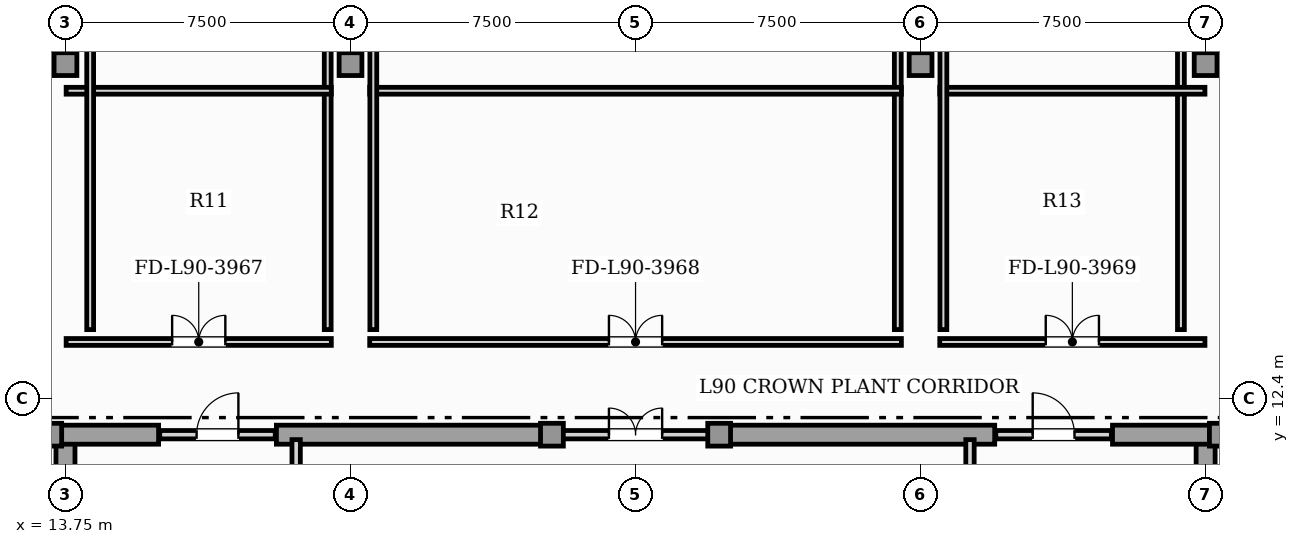
"""IFC4 building model, lengths in metres.
Left out: names, types, materials, properties, quantities, classifications, styles, units other than length and angle.
Written with IfcOpenShell. Run it as: python <this file> out.ifc"""

import sys

from ifc_helpers import new_model, si_unit, direction, frame, frame_2d, origin, origin_2d, place, context, subcontext, project, spatial, rectangle, hollow_rectangle, extrude, element, fill, save


model = new_model("IFC4")
c1 = context("Model", 3, precision=1e-05, world=origin(), true_north=direction((0.0, 1.0)))
c2 = subcontext(c1, "Body", "Model", "MODEL_VIEW")
j1 = project(units=[si_unit("LENGTHUNIT", "METRE"), si_unit("PLANEANGLEUNIT", "RADIAN")], contexts=[c1])
p1 = place(None, origin())
s1 = spatial("IfcSite", under=j1, at=p1, CompositionType="ELEMENT")
p2 = place(p1, origin())
s2 = spatial("IfcBuilding", under=s1, at=p2, CompositionType="ELEMENT")
p3 = place(p2, frame((0.0, 0.0, 366.65)))
s3 = spatial("IfcBuildingStorey", under=s2, at=p3, CompositionType="ELEMENT", Elevation=366.65)
for number, where, z_axis, x_axis in (
    (1, (13.75, 0.92, 0.0), (0.0, 0.0, 1.0), (0.0, 1.0, 0.0)),
    (2, (43.75, 0.92, 0.0), (0.0, 0.0, 1.0), (0.0, 1.0, 0.0)),
):
    element("IfcWall", number, at=place(p3, frame(where, z_axis=z_axis, x_axis=x_axis)), inside=s3, PredefinedType="SHEAR", context=c2, shape_type="SweptSolid", body=[
        extrude(rectangle(XDim=10.53, YDim=0.5, at=frame_2d((5.265, 0.0))), origin(), (0.0, 0.0, 1.0), 5.1),
    ])
p4 = place(p3, frame((13.25, 11.45, 0.0), z_axis=(0.0, 0.0, 1.0), x_axis=(1.0, 0.0, 0.0)))
e3 = element("IfcWall", 3, at=p4, inside=s3, PredefinedType="SHEAR", context=c2, shape_type="SweptSolid", body=[
    extrude(rectangle(XDim=2.95, YDim=0.5, at=frame_2d((1.475, 0.0))), origin(), (0.0, 0.0, 1.0), 5.1),
])
for number, where, z_axis, x_axis in (
    (4, (19.3, 11.45, 0.0), (0.0, 0.0, 1.0), (1.0, 0.0, 0.0)),
    (5, (30.9, 11.45, 0.0), (0.0, 0.0, 1.0), (1.0, 0.0, 0.0)),
):
    element("IfcWall", number, at=place(p3, frame(where, z_axis=z_axis, x_axis=x_axis)), inside=s3, PredefinedType="SHEAR", context=c2, shape_type="SweptSolid", body=[
        extrude(rectangle(XDim=7.3, YDim=0.5, at=frame_2d((3.65, 0.0))), origin(), (0.0, 0.0, 1.0), 5.1),
    ])
p5 = place(p3, frame((41.3, 11.45, 0.0), z_axis=(0.0, 0.0, 1.0), x_axis=(1.0, 0.0, 0.0)))
e6 = element("IfcWall", 6, at=p5, inside=s3, PredefinedType="SHEAR", context=c2, shape_type="SweptSolid", body=[
    extrude(rectangle(XDim=2.95, YDim=0.5, at=frame_2d((1.475, 0.0))), origin(), (0.0, 0.0, 1.0), 5.1),
])
for number, where, z_axis, x_axis in (
    (7, (13.35, 11.45, 0.0), (0.0, 0.0, 1.0), (1.0, 0.0, 0.0)),
    (8, (44.15, 11.45, 0.0), (0.0, 0.0, 1.0), (1.0, 0.0, 0.0)),
    (9, (26.55, 11.45, 0.0), (0.0, 0.0, 1.0), (1.0, 0.0, 0.0)),
    (10, (30.95, 11.45, 0.0), (0.0, 0.0, 1.0), (1.0, 0.0, 0.0)),
    (11, (13.75, 21.2, 0.0), (0.0, 0.0, 1.0), (1.0, 0.0, 0.0)),
    (12, (21.25, 21.2, 0.0), (0.0, 0.0, 1.0), (1.0, 0.0, 0.0)),
    (13, (36.25, 21.2, 0.0), (0.0, 0.0, 1.0), (1.0, 0.0, 0.0)),
    (14, (43.75, 21.2, 0.0), (0.0, 0.0, 1.0), (1.0, 0.0, 0.0)),
):
    element("IfcColumn", number, at=place(p3, frame(where, z_axis=z_axis, x_axis=x_axis)), inside=s3, PredefinedType="USERDEFINED", context=c2, shape_type="SweptSolid", body=[
        extrude(hollow_rectangle(XDim=0.6, YDim=0.6, WallThickness=0.04, at=origin_2d()), origin(), (0.0, 0.0, 1.0), 5.4),
    ])
p6 = place(p3, frame((19.82, 8.52, 0.0), z_axis=(0.0, 0.0, 1.0), x_axis=(0.0, 1.0, 0.0)))
e15 = element("IfcWall", 15, at=p6, inside=s3, PredefinedType="SOLIDWALL", context=c2, shape_type="SweptSolid", body=[
    extrude(rectangle(XDim=2.8, YDim=0.22, at=frame_2d((1.4, 0.0))), origin(), (0.0, 0.0, 1.0), 4.556),
])
p7 = place(p6, frame((0.85, 0.0, 0.0)))
e16 = element("IfcOpeningElement", 16, at=p7, cuts=e15, PredefinedType="OPENING", context=c2, shape_type="SweptSolid", body=[
    extrude(rectangle(XDim=1.1, YDim=2.2, at=frame_2d((0.55, 1.1))), frame((0.0, 0.12, 0.0), z_axis=(0.0, -1.0, 0.0), x_axis=(1.0, 0.0, 0.0)), (0.0, 0.0, 1.0), 0.24),
])
p8 = place(p3, frame((37.55, 8.52, 0.0), z_axis=(0.0, 0.0, 1.0), x_axis=(0.0, 1.0, 0.0)))
e17 = element("IfcWall", 17, at=p8, inside=s3, PredefinedType="SOLIDWALL", context=c2, shape_type="SweptSolid", body=[
    extrude(rectangle(XDim=2.8, YDim=0.22, at=frame_2d((1.4, 0.0))), origin(), (0.0, 0.0, 1.0), 4.556),
])
p9 = place(p8, frame((0.85, 0.0, 0.0)))
e18 = element("IfcOpeningElement", 18, at=p9, cuts=e17, PredefinedType="OPENING", context=c2, shape_type="SweptSolid", body=[
    extrude(rectangle(XDim=1.1, YDim=2.2, at=frame_2d((0.55, 1.1))), frame((0.0, 0.12, 0.0), z_axis=(0.0, -1.0, 0.0), x_axis=(1.0, 0.0, 0.0)), (0.0, 0.0, 1.0), 0.24),
])
p10 = place(p3, frame((16.23, 11.45, 0.0), z_axis=(0.0, 0.0, 1.0), x_axis=(1.0, 0.0, 0.0)))
e19 = element("IfcWall", 19, at=p10, inside=s3, PredefinedType="SOLIDWALL", context=c2, shape_type="SweptSolid", body=[
    extrude(rectangle(XDim=3.04, YDim=0.22, at=frame_2d((1.52, 0.0))), origin(), (0.0, 0.0, 1.0), 5.1),
])
p11 = place(p10, frame((0.97, 0.0, 0.0)))
e20 = element("IfcOpeningElement", 20, at=p11, cuts=e19, PredefinedType="OPENING", context=c2, shape_type="SweptSolid", body=[
    extrude(rectangle(XDim=1.1, YDim=2.2, at=frame_2d((0.55, 1.1))), frame((0.0, 0.12, 0.0), z_axis=(0.0, -1.0, 0.0), x_axis=(1.0, 0.0, 0.0)), (0.0, 0.0, 1.0), 0.24),
])
p12 = place(p3, frame((26.63, 11.45, 0.0), z_axis=(0.0, 0.0, 1.0), x_axis=(1.0, 0.0, 0.0)))
e21 = element("IfcWall", 21, at=p12, inside=s3, PredefinedType="SOLIDWALL", context=c2, shape_type="SweptSolid", body=[
    extrude(rectangle(XDim=4.24, YDim=0.22, at=frame_2d((2.12, 0.0))), origin(), (0.0, 0.0, 1.0), 5.1),
])
p13 = place(p12, frame((1.42, 0.0, 0.0)))
e22 = element("IfcOpeningElement", 22, at=p13, cuts=e21, PredefinedType="OPENING", context=c2, shape_type="SweptSolid", body=[
    extrude(rectangle(XDim=1.4, YDim=2.2, at=frame_2d((0.7, 1.1))), frame((0.0, 0.12, 0.0), z_axis=(0.0, -1.0, 0.0), x_axis=(1.0, 0.0, 0.0)), (0.0, 0.0, 1.0), 0.24),
])
p14 = place(p3, frame((38.23, 11.45, 0.0), z_axis=(0.0, 0.0, 1.0), x_axis=(1.0, 0.0, 0.0)))
e23 = element("IfcWall", 23, at=p14, inside=s3, PredefinedType="SOLIDWALL", context=c2, shape_type="SweptSolid", body=[
    extrude(rectangle(XDim=3.04, YDim=0.22, at=frame_2d((1.52, 0.0))), origin(), (0.0, 0.0, 1.0), 5.1),
])
p15 = place(p14, frame((0.97, 0.0, 0.0)))
e24 = element("IfcOpeningElement", 24, at=p15, cuts=e23, PredefinedType="OPENING", context=c2, shape_type="SweptSolid", body=[
    extrude(rectangle(XDim=1.1, YDim=2.2, at=frame_2d((0.55, 1.1))), frame((0.0, 0.12, 0.0), z_axis=(0.0, -1.0, 0.0), x_axis=(1.0, 0.0, 0.0)), (0.0, 0.0, 1.0), 0.24),
])
p16 = place(p3, frame((13.768, 13.89, 0.0), z_axis=(0.0, 0.0, 1.0), x_axis=(1.0, 0.0, 0.0)))
e25 = element("IfcWall", 25, at=p16, inside=s3, PredefinedType="PARTITIONING", context=c2, shape_type="SweptSolid", body=[
    extrude(rectangle(XDim=6.977, YDim=0.18, at=frame_2d((3.489, 0.0))), origin(), (0.0, 0.0, 1.0), 5.1),
])
p17 = place(p16, frame((2.789, 0.0, 0.0)))
e26 = element("IfcOpeningElement", 26, at=p17, cuts=e25, PredefinedType="OPENING", context=c2, shape_type="SweptSolid", body=[
    extrude(rectangle(XDim=1.4, YDim=2.2, at=frame_2d((0.7, 1.1))), frame((0.0, 0.1, 0.0), z_axis=(0.0, -1.0, 0.0), x_axis=(1.0, 0.0, 0.0)), (0.0, 0.0, 1.0), 0.2),
])
p18 = place(p3, frame((21.755, 13.89, 0.0), z_axis=(0.0, 0.0, 1.0), x_axis=(1.0, 0.0, 0.0)))
e27 = element("IfcWall", 27, at=p18, inside=s3, PredefinedType="PARTITIONING", context=c2, shape_type="SweptSolid", body=[
    extrude(rectangle(XDim=13.99, YDim=0.18, at=frame_2d((6.995, 0.0))), origin(), (0.0, 0.0, 1.0), 5.1),
])
p19 = place(p18, frame((6.295, 0.0, 0.0)))
e28 = element("IfcOpeningElement", 28, at=p19, cuts=e27, PredefinedType="OPENING", context=c2, shape_type="SweptSolid", body=[
    extrude(rectangle(XDim=1.4, YDim=2.2, at=frame_2d((0.7, 1.1))), frame((0.0, 0.1, 0.0), z_axis=(0.0, -1.0, 0.0), x_axis=(1.0, 0.0, 0.0)), (0.0, 0.0, 1.0), 0.2),
])
p20 = place(p3, frame((36.755, 13.89, 0.0), z_axis=(0.0, 0.0, 1.0), x_axis=(1.0, 0.0, 0.0)))
e29 = element("IfcWall", 29, at=p20, inside=s3, PredefinedType="PARTITIONING", context=c2, shape_type="SweptSolid", body=[
    extrude(rectangle(XDim=6.977, YDim=0.18, at=frame_2d((3.489, 0.0))), origin(), (0.0, 0.0, 1.0), 5.1),
])
p21 = place(p20, frame((2.789, 0.0, 0.0)))
e30 = element("IfcOpeningElement", 30, at=p21, cuts=e29, PredefinedType="OPENING", context=c2, shape_type="SweptSolid", body=[
    extrude(rectangle(XDim=1.4, YDim=2.2, at=frame_2d((0.7, 1.1))), frame((0.0, 0.1, 0.0), z_axis=(0.0, -1.0, 0.0), x_axis=(1.0, 0.0, 0.0)), (0.0, 0.0, 1.0), 0.2),
])
p22 = place(p3, frame((20.65, 14.215, 0.0), z_axis=(0.0, 0.0, 1.0), x_axis=(0.0, 1.0, 0.0)))
e31 = element("IfcWall", 31, at=p22, inside=s3, PredefinedType="PARTITIONING", context=c2, shape_type="SweptSolid", body=[
    extrude(rectangle(XDim=7.767, YDim=0.18, at=frame_2d((3.883, 0.0))), origin(), (0.0, 0.0, 1.0), 5.1),
])
p23 = place(p3, frame((20.745, 20.5, 0.0), z_axis=(0.0, 0.0, 1.0), x_axis=(-1.0, 0.0, 0.0)))
e32 = element("IfcWall", 32, at=p23, inside=s3, PredefinedType="PARTITIONING", context=c2, shape_type="SweptSolid", body=[
    extrude(rectangle(XDim=6.977, YDim=0.18, at=frame_2d((3.489, 0.0))), origin(), (0.0, 0.0, 1.0), 5.1),
])
p24 = place(p3, frame((14.4, 21.991, 0.0), z_axis=(0.0, 0.0, 1.0), x_axis=(0.0, -1.0, 0.0)))
e33 = element("IfcWall", 33, at=p24, inside=s3, PredefinedType="PARTITIONING", context=c2, shape_type="SweptSolid", body=[
    extrude(rectangle(XDim=7.776, YDim=0.18, at=frame_2d((3.888, 0.0))), origin(), (0.0, 0.0, 1.0), 5.1),
])
p25 = place(p3, frame((35.65, 14.215, 0.0), z_axis=(0.0, 0.0, 1.0), x_axis=(0.0, 1.0, 0.0)))
e34 = element("IfcWall", 34, at=p25, inside=s3, PredefinedType="PARTITIONING", context=c2, shape_type="SweptSolid", body=[
    extrude(rectangle(XDim=7.767, YDim=0.18, at=frame_2d((3.883, 0.0))), origin(), (0.0, 0.0, 1.0), 5.1),
])
p26 = place(p3, frame((35.745, 20.5, 0.0), z_axis=(0.0, 0.0, 1.0), x_axis=(-1.0, 0.0, 0.0)))
e35 = element("IfcWall", 35, at=p26, inside=s3, PredefinedType="PARTITIONING", context=c2, shape_type="SweptSolid", body=[
    extrude(rectangle(XDim=13.99, YDim=0.18, at=frame_2d((6.995, 0.0))), origin(), (0.0, 0.0, 1.0), 5.1),
])
p27 = place(p3, frame((21.85, 21.982, 0.0), z_axis=(0.0, 0.0, 1.0), x_axis=(0.0, -1.0, 0.0)))
e36 = element("IfcWall", 36, at=p27, inside=s3, PredefinedType="PARTITIONING", context=c2, shape_type="SweptSolid", body=[
    extrude(rectangle(XDim=7.767, YDim=0.18, at=frame_2d((3.883, 0.0))), origin(), (0.0, 0.0, 1.0), 5.1),
])
p28 = place(p3, frame((43.1, 14.215, 0.0), z_axis=(0.0, 0.0, 1.0), x_axis=(0.0, 1.0, 0.0)))
e37 = element("IfcWall", 37, at=p28, inside=s3, PredefinedType="PARTITIONING", context=c2, shape_type="SweptSolid", body=[
    extrude(rectangle(XDim=7.776, YDim=0.18, at=frame_2d((3.888, 0.0))), origin(), (0.0, 0.0, 1.0), 5.1),
])
p29 = place(p3, frame((43.732, 20.5, 0.0), z_axis=(0.0, 0.0, 1.0), x_axis=(-1.0, 0.0, 0.0)))
e38 = element("IfcWall", 38, at=p29, inside=s3, PredefinedType="PARTITIONING", context=c2, shape_type="SweptSolid", body=[
    extrude(rectangle(XDim=6.977, YDim=0.18, at=frame_2d((3.489, 0.0))), origin(), (0.0, 0.0, 1.0), 5.1),
])
p30 = place(p3, frame((36.85, 21.982, 0.0), z_axis=(0.0, 0.0, 1.0), x_axis=(0.0, -1.0, 0.0)))
e39 = element("IfcWall", 39, at=p30, inside=s3, PredefinedType="PARTITIONING", context=c2, shape_type="SweptSolid", body=[
    extrude(rectangle(XDim=7.767, YDim=0.18, at=frame_2d((3.883, 0.0))), origin(), (0.0, 0.0, 1.0), 5.1),
])
p31 = place(p11, origin())
e40 = element("IfcDoor", 40, at=p31, inside=s3, OperationType="SINGLE_SWING_RIGHT", PredefinedType="DOOR", context=c2, shape_type="SweptSolid", body=[
    extrude(rectangle(XDim=1.1, YDim=2.2, at=frame_2d((0.55, 1.1))), frame((0.0, 0.025, 0.0), z_axis=(0.0, -1.0, 0.0), x_axis=(1.0, 0.0, 0.0)), (0.0, 0.0, 1.0), 0.05),
])
fill(e20, e40)
p32 = place(p13, origin())
e41 = element("IfcDoor", 41, at=p32, inside=s3, OperationType="DOUBLE_DOOR_SINGLE_SWING", PredefinedType="DOOR", context=c2, shape_type="SweptSolid", body=[
    extrude(rectangle(XDim=1.4, YDim=2.2, at=frame_2d((0.7, 1.1))), frame((0.0, 0.025, 0.0), z_axis=(0.0, -1.0, 0.0), x_axis=(1.0, 0.0, 0.0)), (0.0, 0.0, 1.0), 0.05),
])
fill(e22, e41)
p33 = place(p15, origin())
e42 = element("IfcDoor", 42, at=p33, inside=s3, OperationType="SINGLE_SWING_LEFT", PredefinedType="DOOR", context=c2, shape_type="SweptSolid", body=[
    extrude(rectangle(XDim=1.1, YDim=2.2, at=frame_2d((0.55, 1.1))), frame((0.0, 0.025, 0.0), z_axis=(0.0, -1.0, 0.0), x_axis=(1.0, 0.0, 0.0)), (0.0, 0.0, 1.0), 0.05),
])
fill(e24, e42)
p34 = place(p17, origin())
e43 = element("IfcDoor", 43, at=p34, inside=s3, OperationType="DOUBLE_DOOR_SINGLE_SWING", PredefinedType="DOOR", context=c2, shape_type="SweptSolid", body=[
    extrude(rectangle(XDim=1.4, YDim=2.2, at=frame_2d((0.7, 1.1))), frame((0.0, 0.025, 0.0), z_axis=(0.0, -1.0, 0.0), x_axis=(1.0, 0.0, 0.0)), (0.0, 0.0, 1.0), 0.05),
])
fill(e26, e43)
p35 = place(p19, origin())
e44 = element("IfcDoor", 44, at=p35, inside=s3, OperationType="DOUBLE_DOOR_SINGLE_SWING", PredefinedType="DOOR", context=c2, shape_type="SweptSolid", body=[
    extrude(rectangle(XDim=1.4, YDim=2.2, at=frame_2d((0.7, 1.1))), frame((0.0, 0.025, 0.0), z_axis=(0.0, -1.0, 0.0), x_axis=(1.0, 0.0, 0.0)), (0.0, 0.0, 1.0), 0.05),
])
fill(e28, e44)
p36 = place(p21, origin())
e45 = element("IfcDoor", 45, at=p36, inside=s3, OperationType="DOUBLE_DOOR_SINGLE_SWING", PredefinedType="DOOR", context=c2, shape_type="SweptSolid", body=[
    extrude(rectangle(XDim=1.4, YDim=2.2, at=frame_2d((0.7, 1.1))), frame((0.0, 0.025, 0.0), z_axis=(0.0, -1.0, 0.0), x_axis=(1.0, 0.0, 0.0)), (0.0, 0.0, 1.0), 0.05),
])
fill(e30, e45)
save(model, sys.argv[1])
